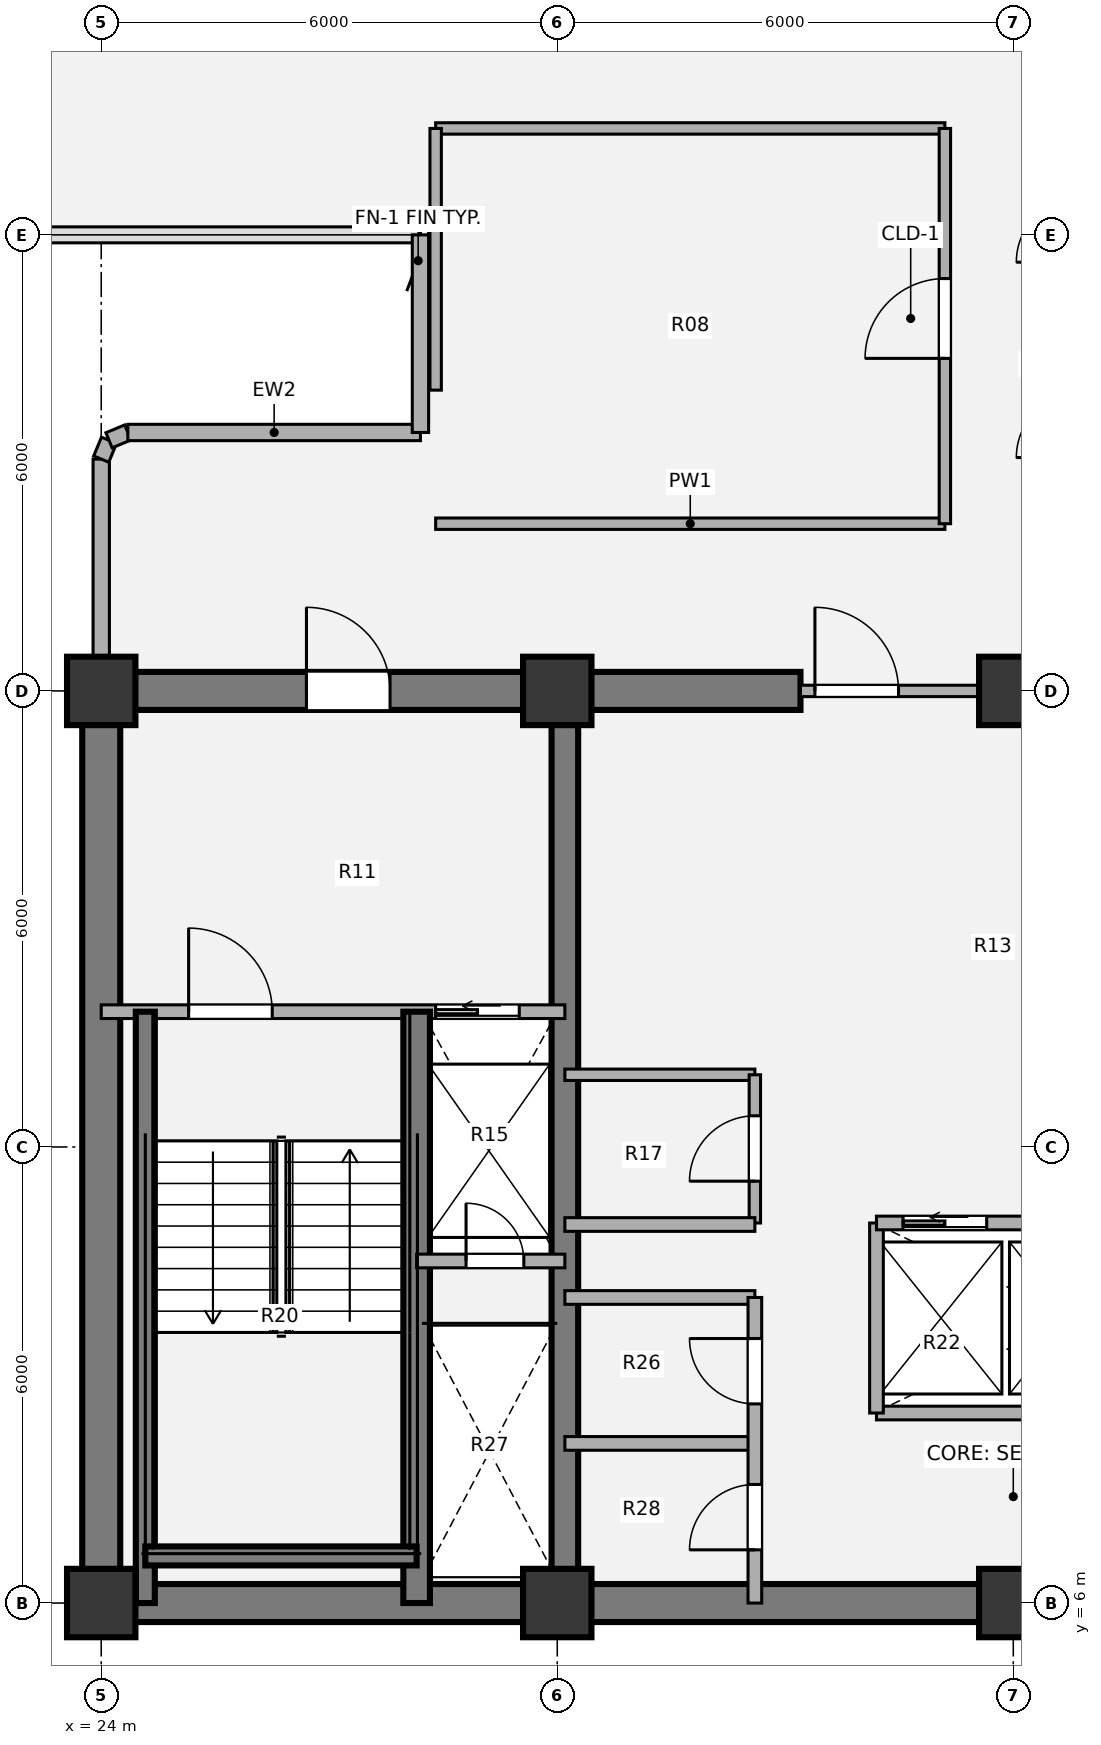
"""IFC4 building model, lengths in metres.
Left out: names, types, materials, properties, quantities, classifications, styles, units other than length and angle.
Written with IfcOpenShell. Run it as: python <this file> out.ifc"""

import sys

from ifc_helpers import new_model, si_unit, direction, frame, frame_2d, origin, origin_2d, place, context, subcontext, project, spatial, rectangle, extrude, source, transform, mapped, element, fill, save


model = new_model("IFC4")
c1 = context("Model", 3, precision=1e-05, world=origin(), true_north=direction((0.0, 1.0)))
c2 = subcontext(c1, "Body", "Model", "MODEL_VIEW")
j1 = project(units=[si_unit("LENGTHUNIT", "METRE"), si_unit("PLANEANGLEUNIT", "RADIAN")], contexts=[c1])
p1 = place(None, origin())
s1 = spatial("IfcSite", under=j1, at=p1, CompositionType="ELEMENT")
p2 = place(p1, origin())
s2 = spatial("IfcBuilding", under=s1, at=p2, CompositionType="ELEMENT")
p3 = place(p2, frame((0.0, 0.0, 116.28)))
s3 = spatial("IfcBuildingStorey", under=s2, at=p3, CompositionType="ELEMENT", Elevation=116.28)
m1 = source(origin(), c2, "Body", "SweptSolid", [
    extrude(rectangle(XDim=0.9, YDim=0.9, at=origin_2d()), origin(), (0.0, 0.0, 1.0), 3.78),
])
for number, where, z_axis, x_axis in (
    (1, (24.0, 6.0, 0.0), (0.0, 0.0, 1.0), (1.0, 0.0, 0.0)),
    (2, (30.0, 6.0, 0.0), (0.0, 0.0, 1.0), (1.0, 0.0, 0.0)),
    (3, (36.0, 6.0, 0.0), (0.0, 0.0, 1.0), (1.0, 0.0, 0.0)),
    (4, (24.0, 18.0, 0.0), (0.0, 0.0, 1.0), (1.0, 0.0, 0.0)),
    (5, (30.0, 18.0, 0.0), (0.0, 0.0, 1.0), (1.0, 0.0, 0.0)),
    (6, (36.0, 18.0, 0.0), (0.0, 0.0, 1.0), (1.0, 0.0, 0.0)),
):
    element("IfcColumn", number, at=place(p3, frame(where, z_axis=z_axis, x_axis=x_axis)), inside=s3, PredefinedType="COLUMN", context=c2, shape_type="MappedRepresentation", body=[
        mapped(m1, transform((0.0, 0.0, 0.0), x_axis=(1.0, 0.0, 0.0), y_axis=(0.0, 1.0, 0.0), z_axis=(0.0, 0.0, 1.0), scale=1.0)),
    ])
p4 = place(p3, frame((48.25, 6.0, 0.0), z_axis=(0.0, 0.0, 1.0), x_axis=(-1.0, 0.0, 0.0)))
e7 = element("IfcWall", 7, at=p4, inside=s3, PredefinedType="SHEAR", context=c2, shape_type="SweptSolid", body=[
    extrude(rectangle(XDim=24.5, YDim=0.5, at=frame_2d((12.25, 0.0))), origin(), (0.0, 0.0, 1.0), 3.78),
])
p5 = place(p3, frame((24.0, 6.0, 0.0), z_axis=(0.0, 0.0, 1.0), x_axis=(0.0, 1.0, 0.0)))
e8 = element("IfcWall", 8, at=p5, inside=s3, PredefinedType="SHEAR", context=c2, shape_type="SweptSolid", body=[
    extrude(rectangle(XDim=12.0, YDim=0.5, at=frame_2d((6.0, 0.0))), origin(), (0.0, 0.0, 1.0), 3.78),
])
p6 = place(p3, frame((23.75, 18.0, 0.0), z_axis=(0.0, 0.0, 1.0), x_axis=(1.0, 0.0, 0.0)))
e9 = element("IfcWall", 9, at=p6, inside=s3, PredefinedType="SHEAR", context=c2, shape_type="SweptSolid", body=[
    extrude(rectangle(XDim=9.45, YDim=0.5, at=frame_2d((4.725, 0.0))), origin(), (0.0, 0.0, 1.0), 3.78),
])
p7 = place(p6, frame((2.95, 0.0, 0.0)))
e10 = element("IfcOpeningElement", 10, at=p7, cuts=e9, PredefinedType="OPENING", context=c2, shape_type="SweptSolid", body=[
    extrude(rectangle(XDim=1.1, YDim=2.1, at=origin_2d()), frame((0.55, 0.26, 1.05), z_axis=(0.0, -1.0, 0.0), x_axis=(1.0, 0.0, 0.0)), (0.0, 0.0, 1.0), 0.52),
])
p8 = place(p3, frame((30.1, 6.0, 0.0), z_axis=(0.0, 0.0, 1.0), x_axis=(0.0, 1.0, 0.0)))
e11 = element("IfcWall", 11, at=p8, inside=s3, PredefinedType="SHEAR", context=c2, shape_type="SweptSolid", body=[
    extrude(rectangle(XDim=12.0, YDim=0.35, at=frame_2d((6.0, 0.0))), origin(), (0.0, 0.0, 1.0), 3.78),
])
p9 = place(p3, frame((24.0, 18.43, 0.0), z_axis=(0.0, 0.0, 1.0), x_axis=(0.0, 1.0, 0.0)))
e12 = element("IfcWall", 12, at=p9, inside=s3, PredefinedType="SOLIDWALL", context=c2, shape_type="SweptSolid", body=[
    extrude(rectangle(XDim=2.62, YDim=0.215, at=frame_2d((1.31, 0.0))), origin(), (0.0, 0.0, 1.0), 3.53),
])
p10 = place(p3, frame((24.0, 21.05, 0.0), z_axis=(0.0, 0.0, 1.0), x_axis=(0.382673670509, 0.923883575944, 0.0)))
e13 = element("IfcWall", 13, at=p10, inside=s3, PredefinedType="SOLIDWALL", context=c2, shape_type="SweptSolid", body=[
    extrude(rectangle(XDim=0.268, YDim=0.215, at=frame_2d((0.134, 0.0))), origin(), (0.0, 0.0, 1.0), 3.53),
])
p11 = place(p3, frame((24.103, 21.298, 0.0), z_axis=(0.0, 0.0, 1.0), x_axis=(0.924205486139, 0.381895560841, 0.0)))
e14 = element("IfcWall", 14, at=p11, inside=s3, PredefinedType="SOLIDWALL", context=c2, shape_type="SweptSolid", body=[
    extrude(rectangle(XDim=0.268, YDim=0.215, at=frame_2d((0.134, 0.0))), origin(), (0.0, 0.0, 1.0), 3.53),
])
p12 = place(p3, frame((24.35, 21.4, 0.0), z_axis=(0.0, 0.0, 1.0), x_axis=(1.0, 0.0, 0.0)))
e15 = element("IfcWall", 15, at=p12, inside=s3, PredefinedType="SOLIDWALL", context=c2, shape_type="SweptSolid", body=[
    extrude(rectangle(XDim=3.85, YDim=0.215, at=frame_2d((1.925, 0.0))), origin(), (0.0, 0.0, 1.0), 3.53),
])
p13 = place(p3, frame((28.2, 21.4, 0.0), z_axis=(0.0, 0.0, 1.0), x_axis=(0.0, 1.0, 0.0)))
e16 = element("IfcWall", 16, at=p13, inside=s3, PredefinedType="SOLIDWALL", context=c2, shape_type="SweptSolid", body=[
    extrude(rectangle(XDim=2.6, YDim=0.215, at=frame_2d((1.3, 0.0))), origin(), (0.0, 0.0, 1.0), 3.53),
])
p14 = place(p3, frame((30.1, 12.95, 0.0), z_axis=(0.0, 0.0, 1.0), x_axis=(1.0, 0.0, 0.0)))
e17 = element("IfcWall", 17, at=p14, inside=s3, PredefinedType="PARTITIONING", context=c2, shape_type="SweptSolid", body=[
    extrude(rectangle(XDim=2.5, YDim=0.15, at=frame_2d((1.25, 0.0))), origin(), (0.0, 0.0, 1.0), 3.5),
])
p15 = place(p3, frame((32.6, 11.0, 0.0), z_axis=(0.0, 0.0, 1.0), x_axis=(0.0, 1.0, 0.0)))
e18 = element("IfcWall", 18, at=p15, inside=s3, PredefinedType="PARTITIONING", context=c2, shape_type="SweptSolid", body=[
    extrude(rectangle(XDim=1.95, YDim=0.15, at=frame_2d((0.975, 0.0))), origin(), (0.0, 0.0, 1.0), 3.5),
])
p16 = place(p15, frame((0.55, 0.0, 0.0)))
e19 = element("IfcOpeningElement", 19, at=p16, cuts=e18, PredefinedType="OPENING", context=c2, shape_type="SweptSolid", body=[
    extrude(rectangle(XDim=0.86, YDim=2.1, at=origin_2d()), frame((0.43, 0.085, 1.05), z_axis=(0.0, -1.0, 0.0), x_axis=(1.0, 0.0, 0.0)), (0.0, 0.0, 1.0), 0.17),
])
p17 = place(p3, frame((34.2, 8.5, 0.0), z_axis=(0.0, 0.0, 1.0), x_axis=(1.0, 0.0, 0.0)))
e20 = element("IfcWall", 20, at=p17, inside=s3, PredefinedType="PARTITIONING", context=c2, shape_type="SweptSolid", body=[
    extrude(rectangle(XDim=5.15, YDim=0.18, at=frame_2d((2.575, 0.0))), origin(), (0.0, 0.0, 1.0), 3.5),
])
for number, where, z_axis, x_axis in (
    (21, (34.2, 8.5, 0.0), (0.0, 0.0, 1.0), (0.0, 1.0, 0.0)),
    (22, (30.1, 10.98, 0.0), (0.0, 0.0, 1.0), (1.0, 0.0, 0.0)),
    (23, (30.1, 8.1, 0.0), (0.0, 0.0, 1.0), (1.0, 0.0, 0.0)),
    (24, (30.1, 10.02, 0.0), (0.0, 0.0, 1.0), (1.0, 0.0, 0.0)),
):
    element("IfcWall", number, at=place(p3, frame(where, z_axis=z_axis, x_axis=x_axis)), inside=s3, PredefinedType="PARTITIONING", context=c2, shape_type="SweptSolid", body=[
        extrude(rectangle(XDim=2.5, YDim=0.18, at=frame_2d((1.25, 0.0))), origin(), (0.0, 0.0, 1.0), 3.5),
    ])
p18 = place(p3, frame((32.6, 6.0, 0.0), z_axis=(0.0, 0.0, 1.0), x_axis=(0.0, 1.0, 0.0)))
e25 = element("IfcWall", 25, at=p18, inside=s3, PredefinedType="PARTITIONING", context=c2, shape_type="SweptSolid", body=[
    extrude(rectangle(XDim=4.02, YDim=0.18, at=frame_2d((2.01, 0.0))), origin(), (0.0, 0.0, 1.0), 3.5),
])
p19 = place(p18, frame((0.7, 0.0, 0.0)))
e26 = element("IfcOpeningElement", 26, at=p19, cuts=e25, PredefinedType="OPENING", context=c2, shape_type="SweptSolid", body=[
    extrude(rectangle(XDim=0.86, YDim=2.1, at=origin_2d()), frame((0.43, 0.1, 1.05), z_axis=(0.0, -1.0, 0.0), x_axis=(1.0, 0.0, 0.0)), (0.0, 0.0, 1.0), 0.2),
])
p20 = place(p18, frame((2.62, 0.0, 0.0)))
e27 = element("IfcOpeningElement", 27, at=p20, cuts=e25, PredefinedType="OPENING", context=c2, shape_type="SweptSolid", body=[
    extrude(rectangle(XDim=0.86, YDim=2.1, at=origin_2d()), frame((0.43, 0.1, 1.05), z_axis=(0.0, -1.0, 0.0), x_axis=(1.0, 0.0, 0.0)), (0.0, 0.0, 1.0), 0.2),
])
p21 = place(p3, frame((33.2, 18.0, 0.0), z_axis=(0.0, 0.0, 1.0), x_axis=(1.0, 0.0, 0.0)))
e28 = element("IfcWall", 28, at=p21, inside=s3, PredefinedType="PARTITIONING", context=c2, shape_type="SweptSolid", body=[
    extrude(rectangle(XDim=5.6, YDim=0.15, at=frame_2d((2.8, 0.0))), origin(), (0.0, 0.0, 1.0), 2.315),
])
p22 = place(p21, frame((0.19, 0.0, 0.0)))
e29 = element("IfcOpeningElement", 29, at=p22, cuts=e28, PredefinedType="OPENING", context=c2, shape_type="SweptSolid", body=[
    extrude(rectangle(XDim=1.1, YDim=2.1, at=origin_2d()), frame((0.55, 0.085, 1.05), z_axis=(0.0, -1.0, 0.0), x_axis=(1.0, 0.0, 0.0)), (0.0, 0.0, 1.0), 0.17),
])
p23 = place(p21, frame((4.31, 0.0, 0.0)))
e30 = element("IfcOpeningElement", 30, at=p23, cuts=e28, PredefinedType="OPENING", context=c2, shape_type="SweptSolid", body=[
    extrude(rectangle(XDim=1.1, YDim=2.1, at=origin_2d()), frame((0.55, 0.085, 1.05), z_axis=(0.0, -1.0, 0.0), x_axis=(1.0, 0.0, 0.0)), (0.0, 0.0, 1.0), 0.17),
])
p24 = place(p3, frame((24.0, 13.78, 0.0), z_axis=(0.0, 0.0, 1.0), x_axis=(1.0, 0.0, 0.0)))
e31 = element("IfcWall", 31, at=p24, inside=s3, PredefinedType="PARTITIONING", context=c2, shape_type="SweptSolid", body=[
    extrude(rectangle(XDim=6.1, YDim=0.18, at=frame_2d((3.05, 0.0))), origin(), (0.0, 0.0, 1.0), 3.5),
])
p25 = place(p24, frame((1.15, 0.0, 0.0)))
e32 = element("IfcOpeningElement", 32, at=p25, cuts=e31, PredefinedType="OPENING", context=c2, shape_type="SweptSolid", body=[
    extrude(rectangle(XDim=1.1, YDim=2.1, at=origin_2d()), frame((0.55, 0.1, 1.05), z_axis=(0.0, -1.0, 0.0), x_axis=(1.0, 0.0, 0.0)), (0.0, 0.0, 1.0), 0.2),
])
p26 = place(p24, frame((4.4, 0.0, 0.0)))
e33 = element("IfcOpeningElement", 33, at=p26, cuts=e31, PredefinedType="OPENING", context=c2, shape_type="SweptSolid", body=[
    extrude(rectangle(XDim=1.1, YDim=2.1, at=origin_2d()), frame((0.55, 0.1, 1.05), z_axis=(0.0, -1.0, 0.0), x_axis=(1.0, 0.0, 0.0)), (0.0, 0.0, 1.0), 0.2),
])
p27 = place(p3, frame((28.15, 6.0, 0.0), z_axis=(0.0, 0.0, 1.0), x_axis=(0.0, 1.0, 0.0)))
e34 = element("IfcWall", 34, at=p27, inside=s3, PredefinedType="SHEAR", context=c2, shape_type="SweptSolid", body=[
    extrude(rectangle(XDim=7.78, YDim=0.35, at=frame_2d((3.89, 0.0))), origin(), (0.0, 0.0, 1.0), 3.85),
])
p28 = place(p3, frame((24.58, 6.0, 0.0), z_axis=(0.0, 0.0, 1.0), x_axis=(0.0, 1.0, 0.0)))
e35 = element("IfcWall", 35, at=p28, inside=s3, PredefinedType="SHEAR", context=c2, shape_type="SweptSolid", body=[
    extrude(rectangle(XDim=7.78, YDim=0.25, at=frame_2d((3.89, 0.0))), origin(), (0.0, 0.0, 1.0), 3.85),
])
p29 = place(p3, frame((24.58, 6.62, 0.0), z_axis=(0.0, 0.0, 1.0), x_axis=(1.0, 0.0, 0.0)))
e36 = element("IfcWall", 36, at=p29, inside=s3, PredefinedType="SHEAR", context=c2, shape_type="SweptSolid", body=[
    extrude(rectangle(XDim=3.57, YDim=0.25, at=frame_2d((1.785, 0.0))), origin(), (0.0, 0.0, 1.0), 3.85),
])
p30 = place(p3, frame((28.15, 10.5, 0.0), z_axis=(0.0, 0.0, 1.0), x_axis=(1.0, 0.0, 0.0)))
e37 = element("IfcWall", 37, at=p30, inside=s3, PredefinedType="PARTITIONING", context=c2, shape_type="SweptSolid", body=[
    extrude(rectangle(XDim=1.95, YDim=0.18, at=frame_2d((0.975, 0.0))), origin(), (0.0, 0.0, 1.0), 3.5),
])
p31 = place(p30, frame((0.65, 0.0, 0.0)))
e38 = element("IfcOpeningElement", 38, at=p31, cuts=e37, PredefinedType="OPENING", context=c2, shape_type="SweptSolid", body=[
    extrude(rectangle(XDim=0.76, YDim=2.05, at=origin_2d()), frame((0.38, 0.1, 1.025), z_axis=(0.0, -1.0, 0.0), x_axis=(1.0, 0.0, 0.0)), (0.0, 0.0, 1.0), 0.2),
])
p32 = place(p3, frame((34.2, 11.0, 0.0), z_axis=(0.0, 0.0, 1.0), x_axis=(1.0, 0.0, 0.0)))
e39 = element("IfcWall", 39, at=p32, inside=s3, PredefinedType="PARTITIONING", context=c2, shape_type="SweptSolid", body=[
    extrude(rectangle(XDim=5.15, YDim=0.18, at=frame_2d((2.575, 0.0))), origin(), (0.0, 0.0, 1.0), 3.5),
])
p33 = place(p32, frame((0.35, 0.0, 0.0)))
e40 = element("IfcOpeningElement", 40, at=p33, cuts=e39, PredefinedType="OPENING", context=c2, shape_type="SweptSolid", body=[
    extrude(rectangle(XDim=1.1, YDim=2.1, at=origin_2d()), frame((0.55, 0.1, 1.05), z_axis=(0.0, -1.0, 0.0), x_axis=(1.0, 0.0, 0.0)), (0.0, 0.0, 1.0), 0.2),
])
p34 = place(p32, frame((2.05, 0.0, 0.0)))
e41 = element("IfcOpeningElement", 41, at=p34, cuts=e39, PredefinedType="OPENING", context=c2, shape_type="SweptSolid", body=[
    extrude(rectangle(XDim=1.1, YDim=2.1, at=origin_2d()), frame((0.55, 0.1, 1.05), z_axis=(0.0, -1.0, 0.0), x_axis=(1.0, 0.0, 0.0)), (0.0, 0.0, 1.0), 0.2),
])
p35 = place(p32, frame((3.7, 0.0, 0.0)))
e42 = element("IfcOpeningElement", 42, at=p35, cuts=e39, PredefinedType="OPENING", context=c2, shape_type="SweptSolid", body=[
    extrude(rectangle(XDim=1.1, YDim=2.1, at=origin_2d()), frame((0.55, 0.1, 1.05), z_axis=(0.0, -1.0, 0.0), x_axis=(1.0, 0.0, 0.0)), (0.0, 0.0, 1.0), 0.2),
])
for number, where, z_axis, x_axis in (
    (43, (28.4, 20.2, 0.0), (0.0, 0.0, 1.0), (1.0, 0.0, 0.0)),
    (44, (28.4, 25.4, 0.0), (0.0, 0.0, 1.0), (1.0, 0.0, 0.0)),
):
    element("IfcWall", number, at=place(p3, frame(where, z_axis=z_axis, x_axis=x_axis)), inside=s3, PredefinedType="PARTITIONING", context=c2, shape_type="SweptSolid", body=[
        extrude(rectangle(XDim=6.7, YDim=0.15, at=frame_2d((3.35, 0.0))), origin(), (0.0, 0.0, 1.0), 3.5),
    ])
p36 = place(p3, frame((28.4, 21.957, 0.0), z_axis=(0.0, 0.0, 1.0), x_axis=(0.0, 1.0, 0.0)))
e45 = element("IfcWall", 45, at=p36, inside=s3, PredefinedType="PARTITIONING", context=c2, shape_type="SweptSolid", body=[
    extrude(rectangle(XDim=3.443, YDim=0.15, at=frame_2d((1.721, 0.0))), origin(), (0.0, 0.0, 1.0), 3.5),
])
p37 = place(p3, frame((35.1, 20.2, 0.0), z_axis=(0.0, 0.0, 1.0), x_axis=(0.0, 1.0, 0.0)))
e46 = element("IfcWall", 46, at=p37, inside=s3, PredefinedType="PARTITIONING", context=c2, shape_type="SweptSolid", body=[
    extrude(rectangle(XDim=5.2, YDim=0.15, at=frame_2d((2.6, 0.0))), origin(), (0.0, 0.0, 1.0), 3.5),
])
p38 = place(p37, frame((2.175, 0.0, 0.0)))
e47 = element("IfcOpeningElement", 47, at=p38, cuts=e46, PredefinedType="OPENING", context=c2, shape_type="SweptSolid", body=[
    extrude(rectangle(XDim=1.05, YDim=2.1, at=origin_2d()), frame((0.525, 0.085, 1.05), z_axis=(0.0, -1.0, 0.0), x_axis=(1.0, 0.0, 0.0)), (0.0, 0.0, 1.0), 0.17),
])
m2 = source(origin(), c2, "Body", "SweptSolid", [
    extrude(rectangle(XDim=0.86, YDim=2.1, at=origin_2d()), frame((0.43, 0.025, 1.05), z_axis=(0.0, -1.0, 0.0), x_axis=(1.0, 0.0, 0.0)), (0.0, 0.0, 1.0), 0.05),
])
p39 = place(p16, origin())
e48 = element("IfcDoor", 48, at=p39, inside=s3, OperationType="SINGLE_SWING_LEFT", PredefinedType="DOOR", context=c2, shape_type="MappedRepresentation", body=[
    mapped(m2, transform((0.0, 0.0, 0.0), x_axis=(1.0, 0.0, 0.0), y_axis=(0.0, 1.0, 0.0), z_axis=(0.0, 0.0, 1.0), scale=1.0)),
])
fill(e19, e48)
p40 = place(p19, origin())
e49 = element("IfcDoor", 49, at=p40, inside=s3, OperationType="SINGLE_SWING_LEFT", PredefinedType="DOOR", context=c2, shape_type="MappedRepresentation", body=[
    mapped(m2, transform((0.0, 0.0, 0.0), x_axis=(1.0, 0.0, 0.0), y_axis=(0.0, 1.0, 0.0), z_axis=(0.0, 0.0, 1.0), scale=1.0)),
])
fill(e26, e49)
p41 = place(p20, origin())
e50 = element("IfcDoor", 50, at=p41, inside=s3, OperationType="SINGLE_SWING_RIGHT", PredefinedType="DOOR", context=c2, shape_type="MappedRepresentation", body=[
    mapped(m2, transform((0.0, 0.0, 0.0), x_axis=(1.0, 0.0, 0.0), y_axis=(0.0, 1.0, 0.0), z_axis=(0.0, 0.0, 1.0), scale=1.0)),
])
fill(e27, e50)
m3 = source(origin(), c2, "Body", "SweptSolid", [
    extrude(rectangle(XDim=1.1, YDim=2.1, at=origin_2d()), frame((0.55, 0.025, 1.05), z_axis=(0.0, -1.0, 0.0), x_axis=(1.0, 0.0, 0.0)), (0.0, 0.0, 1.0), 0.05),
])
p42 = place(p22, origin())
e51 = element("IfcDoor", 51, at=p42, inside=s3, OperationType="SINGLE_SWING_LEFT", PredefinedType="DOOR", context=c2, shape_type="MappedRepresentation", body=[
    mapped(m3, transform((0.0, 0.0, 0.0), x_axis=(1.0, 0.0, 0.0), y_axis=(0.0, 1.0, 0.0), z_axis=(0.0, 0.0, 1.0), scale=1.0)),
])
fill(e29, e51)
m4 = source(origin(), c2, "Body", "SweptSolid", [
    extrude(rectangle(XDim=1.1, YDim=2.1, at=origin_2d()), frame((0.55, 0.025, 1.05), z_axis=(0.0, -1.0, 0.0), x_axis=(1.0, 0.0, 0.0)), (0.0, 0.0, 1.0), 0.05),
])
p43 = place(p25, origin())
e52 = element("IfcDoor", 52, at=p43, inside=s3, OperationType="SINGLE_SWING_LEFT", PredefinedType="DOOR", context=c2, shape_type="MappedRepresentation", body=[
    mapped(m4, transform((0.0, 0.0, 0.0), x_axis=(1.0, 0.0, 0.0), y_axis=(0.0, 1.0, 0.0), z_axis=(0.0, 0.0, 1.0), scale=1.0)),
])
fill(e32, e52)
m5 = source(origin(), c2, "Body", "SweptSolid", [
    extrude(rectangle(XDim=1.1, YDim=2.1, at=origin_2d()), frame((0.55, 0.025, 1.05), z_axis=(0.0, -1.0, 0.0), x_axis=(1.0, 0.0, 0.0)), (0.0, 0.0, 1.0), 0.05),
])
p44 = place(p26, origin())
e53 = element("IfcDoor", 53, at=p44, inside=s3, OperationType="SLIDING_TO_LEFT", PredefinedType="DOOR", context=c2, shape_type="MappedRepresentation", body=[
    mapped(m5, transform((0.0, 0.0, 0.0), x_axis=(1.0, 0.0, 0.0), y_axis=(0.0, 1.0, 0.0), z_axis=(0.0, 0.0, 1.0), scale=1.0)),
])
fill(e33, e53)
m6 = source(origin(), c2, "Body", "SweptSolid", [
    extrude(rectangle(XDim=0.76, YDim=2.05, at=origin_2d()), frame((0.38, 0.025, 1.025), z_axis=(0.0, -1.0, 0.0), x_axis=(1.0, 0.0, 0.0)), (0.0, 0.0, 1.0), 0.05),
])
p45 = place(p31, origin())
e54 = element("IfcDoor", 54, at=p45, inside=s3, OperationType="SINGLE_SWING_LEFT", PredefinedType="DOOR", context=c2, shape_type="MappedRepresentation", body=[
    mapped(m6, transform((0.0, 0.0, 0.0), x_axis=(1.0, 0.0, 0.0), y_axis=(0.0, 1.0, 0.0), z_axis=(0.0, 0.0, 1.0), scale=1.0)),
])
fill(e38, e54)
p46 = place(p7, origin())
e55 = element("IfcDoor", 55, at=p46, inside=s3, OperationType="SINGLE_SWING_LEFT", PredefinedType="DOOR", context=c2, shape_type="MappedRepresentation", body=[
    mapped(m3, transform((0.0, 0.0, 0.0), x_axis=(1.0, 0.0, 0.0), y_axis=(0.0, 1.0, 0.0), z_axis=(0.0, 0.0, 1.0), scale=1.0)),
])
fill(e10, e55)
p47 = place(p33, origin())
e56 = element("IfcDoor", 56, at=p47, inside=s3, OperationType="SLIDING_TO_LEFT", PredefinedType="DOOR", context=c2, shape_type="MappedRepresentation", body=[
    mapped(m5, transform((0.0, 0.0, 0.0), x_axis=(1.0, 0.0, 0.0), y_axis=(0.0, 1.0, 0.0), z_axis=(0.0, 0.0, 1.0), scale=1.0)),
])
fill(e40, e56)
m7 = source(origin(), c2, "Body", "SweptSolid", [
    extrude(rectangle(XDim=1.05, YDim=2.1, at=origin_2d()), frame((0.525, 0.025, 1.05), z_axis=(0.0, -1.0, 0.0), x_axis=(1.0, 0.0, 0.0)), (0.0, 0.0, 1.0), 0.05),
])
p48 = place(p38, origin())
e57 = element("IfcDoor", 57, at=p48, inside=s3, OperationType="SINGLE_SWING_LEFT", PredefinedType="DOOR", context=c2, shape_type="MappedRepresentation", body=[
    mapped(m7, transform((0.0, 0.0, 0.0), x_axis=(1.0, 0.0, 0.0), y_axis=(0.0, 1.0, 0.0), z_axis=(0.0, 0.0, 1.0), scale=1.0)),
])
fill(e47, e57)
save(model, sys.argv[1])
